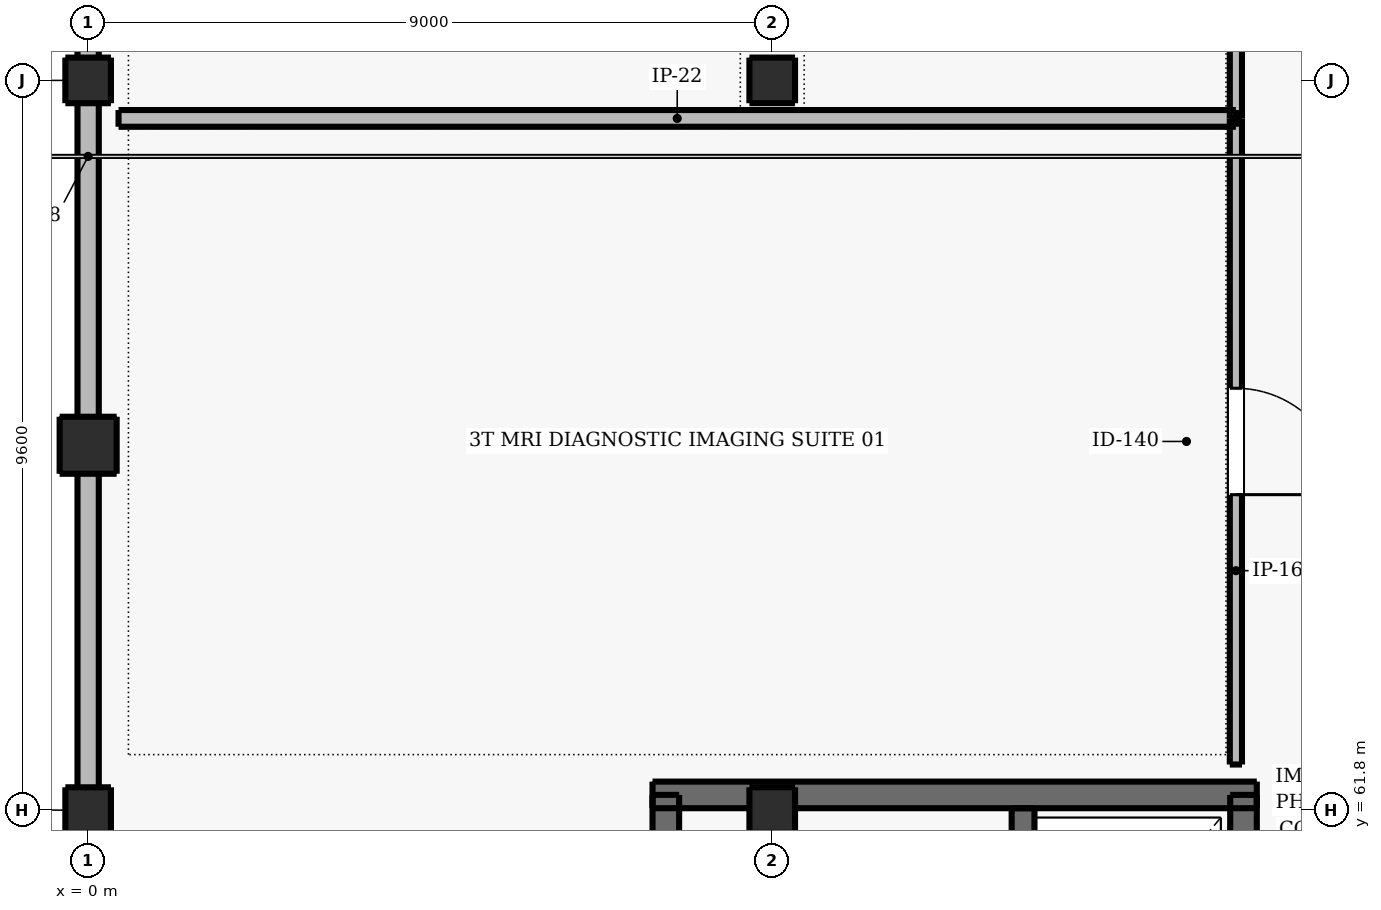
"""IFC4 building model, lengths in metres.
Left out: names, types, materials, properties, quantities, classifications, styles, units other than length and angle.
Written with IfcOpenShell. Run it as: python <this file> out.ifc"""

import sys

from ifc_helpers import new_model, si_unit, direction, frame, frame_2d, origin, origin_2d, place, context, subcontext, project, spatial, rectangle, extrude, element, fill, save


model = new_model("IFC4")
c1 = context("Model", 3, precision=1e-05, world=origin(), true_north=direction((0.0, 1.0)))
c2 = subcontext(c1, "Body", "Model", "MODEL_VIEW")
j1 = project(units=[si_unit("LENGTHUNIT", "METRE"), si_unit("PLANEANGLEUNIT", "RADIAN")], contexts=[c1])
p1 = place(None, origin())
s1 = spatial("IfcSite", under=j1, at=p1, CompositionType="ELEMENT")
p2 = place(p1, origin())
s2 = spatial("IfcBuilding", under=s1, at=p2, CompositionType="ELEMENT")
p3 = place(p2, origin())
s3 = spatial("IfcBuildingStorey", under=s2, at=p3, CompositionType="ELEMENT", Elevation=0.0)
p4 = place(p3, frame((0.0, 61.8, 0.0), z_axis=(0.0, 0.0, 1.0), x_axis=(1.0, 0.0, 0.0)))
e1 = element("IfcColumn", 1, at=p4, inside=s3, PredefinedType="COLUMN", context=c2, shape_type="SweptSolid", body=[
    extrude(rectangle(XDim=0.6, YDim=0.6, at=origin_2d()), origin(), (0.0, 0.0, 1.0), 5.1),
])
p5 = place(p3, frame((0.0, 66.6, 0.0), z_axis=(0.0, 0.0, 1.0), x_axis=(1.0, 0.0, 0.0)))
e2 = element("IfcColumn", 2, at=p5, inside=s3, PredefinedType="PILASTER", context=c2, shape_type="SweptSolid", body=[
    extrude(rectangle(XDim=0.75, YDim=0.75, at=origin_2d()), origin(), (0.0, 0.0, 1.0), 5.1),
])
for number, where, z_axis, x_axis in (
    (3, (0.0, 71.4, 0.0), (0.0, 0.0, 1.0), (1.0, 0.0, 0.0)),
    (4, (9.0, 61.8, 0.0), (0.0, 0.0, 1.0), (1.0, 0.0, 0.0)),
    (5, (9.0, 71.4, 0.0), (0.0, 0.0, 1.0), (1.0, 0.0, 0.0)),
):
    element("IfcColumn", number, at=place(p3, frame(where, z_axis=z_axis, x_axis=x_axis)), inside=s3, PredefinedType="COLUMN", context=c2, shape_type="SweptSolid", body=[
        extrude(rectangle(XDim=0.6, YDim=0.6, at=origin_2d()), origin(), (0.0, 0.0, 1.0), 5.1),
    ])
p6 = place(p3, frame((7.425, 62.0, 0.0), z_axis=(0.0, 0.0, 1.0), x_axis=(1.0, 0.0, 0.0)))
e6 = element("IfcWall", 6, at=p6, inside=s3, PredefinedType="SHEAR", context=c2, shape_type="SweptSolid", body=[
    extrude(rectangle(XDim=7.95, YDim=0.35, at=frame_2d((3.975, 0.0))), origin(), (0.0, 0.0, 1.0), 5.1),
])
for number, where, z_axis, x_axis in (
    (7, (7.6, 54.8, 0.0), (0.0, 0.0, 1.0), (0.0, 1.0, 0.0)),
    (8, (15.2, 54.8, 0.0), (0.0, 0.0, 1.0), (0.0, 1.0, 0.0)),
):
    element("IfcWall", number, at=place(p3, frame(where, z_axis=z_axis, x_axis=x_axis)), inside=s3, PredefinedType="SHEAR", context=c2, shape_type="SweptSolid", body=[
        extrude(rectangle(XDim=7.2, YDim=0.35, at=frame_2d((3.6, 0.0))), origin(), (0.0, 0.0, 1.0), 5.1),
    ])
p7 = place(p3, frame((12.3, 58.5, 0.0), z_axis=(0.0, 0.0, 1.0), x_axis=(0.0, 1.0, 0.0)))
e9 = element("IfcWall", 9, at=p7, inside=s3, PredefinedType="SHEAR", context=c2, shape_type="SweptSolid", body=[
    extrude(rectangle(XDim=3.325, YDim=0.3, at=frame_2d((1.663, 0.0))), origin(), (0.0, 0.0, 1.0), 5.1),
])
p8 = place(p7, frame((1.113, 0.0, 0.0)))
e10 = element("IfcOpeningElement", 10, at=p8, cuts=e9, PredefinedType="OPENING", context=c2, shape_type="SweptSolid", body=[
    extrude(rectangle(XDim=1.1, YDim=2.15, at=frame_2d((0.55, 1.075))), frame((0.0, 0.16, 0.0), z_axis=(0.0, -1.0, 0.0), x_axis=(1.0, 0.0, 0.0)), (0.0, 0.0, 1.0), 0.32),
])
p9 = place(p3, frame((0.0, 45.0, 0.0), z_axis=(0.0, 0.0, 1.0), x_axis=(0.0, 1.0, 0.0)))
e11 = element("IfcWall", 11, at=p9, inside=s3, PredefinedType="SOLIDWALL", context=c2, shape_type="SweptSolid", body=[
    extrude(rectangle(XDim=50.8, YDim=0.28, at=frame_2d((25.4, 0.0))), origin(), (0.0, 0.0, 1.0), 4.16),
])
p10 = place(p9, frame((2.3, 0.0, 0.0)))
e12 = element("IfcOpeningElement", 12, at=p10, cuts=e11, PredefinedType="OPENING", context=c2, shape_type="SweptSolid", body=[
    extrude(rectangle(XDim=2.6, YDim=2.6, at=frame_2d((1.3, 1.3))), frame((0.0, 0.15, 0.0), z_axis=(0.0, -1.0, 0.0), x_axis=(1.0, 0.0, 0.0)), (0.0, 0.0, 1.0), 0.3),
])
p11 = place(p3, frame((15.1, 62.4, 0.0), z_axis=(0.0, 0.0, 1.0), x_axis=(0.0, 1.0, 0.0)))
e13 = element("IfcWall", 13, at=p11, inside=s3, PredefinedType="PARTITIONING", context=c2, shape_type="SweptSolid", body=[
    extrude(rectangle(XDim=8.5, YDim=0.16, at=frame_2d((4.25, 0.0))), origin(), (0.0, 0.0, 1.0), 4.53),
])
p12 = place(p11, frame((3.55, 0.0, 0.0)))
e14 = element("IfcOpeningElement", 14, at=p12, cuts=e13, PredefinedType="OPENING", context=c2, shape_type="SweptSolid", body=[
    extrude(rectangle(XDim=1.4, YDim=2.2, at=frame_2d((0.7, 1.1))), frame((0.0, 0.09, 0.0), z_axis=(0.0, -1.0, 0.0), x_axis=(1.0, 0.0, 0.0)), (0.0, 0.0, 1.0), 0.18),
])
p13 = place(p3, frame((0.4, 70.9, 0.0), z_axis=(0.0, 0.0, 1.0), x_axis=(1.0, 0.0, 0.0)))
e15 = element("IfcWall", 15, at=p13, inside=s3, PredefinedType="PARTITIONING", context=c2, shape_type="SweptSolid", body=[
    extrude(rectangle(XDim=14.7, YDim=0.22, at=frame_2d((7.35, 0.0))), origin(), (0.0, 0.0, 1.0), 4.82),
])
p14 = place(p3, frame((15.1, 70.9, 0.0), z_axis=(0.0, 0.0, 1.0), x_axis=(0.0, 1.0, 0.0)))
e16 = element("IfcWall", 16, at=p14, inside=s3, PredefinedType="PARTITIONING", context=c2, shape_type="SweptSolid", body=[
    extrude(rectangle(XDim=8.5, YDim=0.16, at=frame_2d((4.25, 0.0))), origin(), (0.0, 0.0, 1.0), 4.49),
])
p15 = place(p14, frame((3.65, 0.0, 0.0)))
e17 = element("IfcOpeningElement", 17, at=p15, cuts=e16, PredefinedType="OPENING", context=c2, shape_type="SweptSolid", body=[
    extrude(rectangle(XDim=1.25, YDim=2.2, at=frame_2d((0.625, 1.1))), frame((0.0, 0.09, 0.0), z_axis=(0.0, -1.0, 0.0), x_axis=(1.0, 0.0, 0.0)), (0.0, 0.0, 1.0), 0.18),
])
p16 = place(p12, frame((1.4, 0.0, 0.0), z_axis=(0.0, 0.0, 1.0), x_axis=(-1.0, 0.0, 0.0)))
e18 = element("IfcDoor", 18, at=p16, inside=s3, OperationType="SINGLE_SWING_LEFT", PredefinedType="DOOR", context=c2, shape_type="SweptSolid", body=[
    extrude(rectangle(XDim=1.4, YDim=2.2, at=frame_2d((0.7, 1.1))), frame((0.0, 0.025, 0.0), z_axis=(0.0, -1.0, 0.0), x_axis=(1.0, 0.0, 0.0)), (0.0, 0.0, 1.0), 0.05),
])
fill(e14, e18)
save(model, sys.argv[1])
